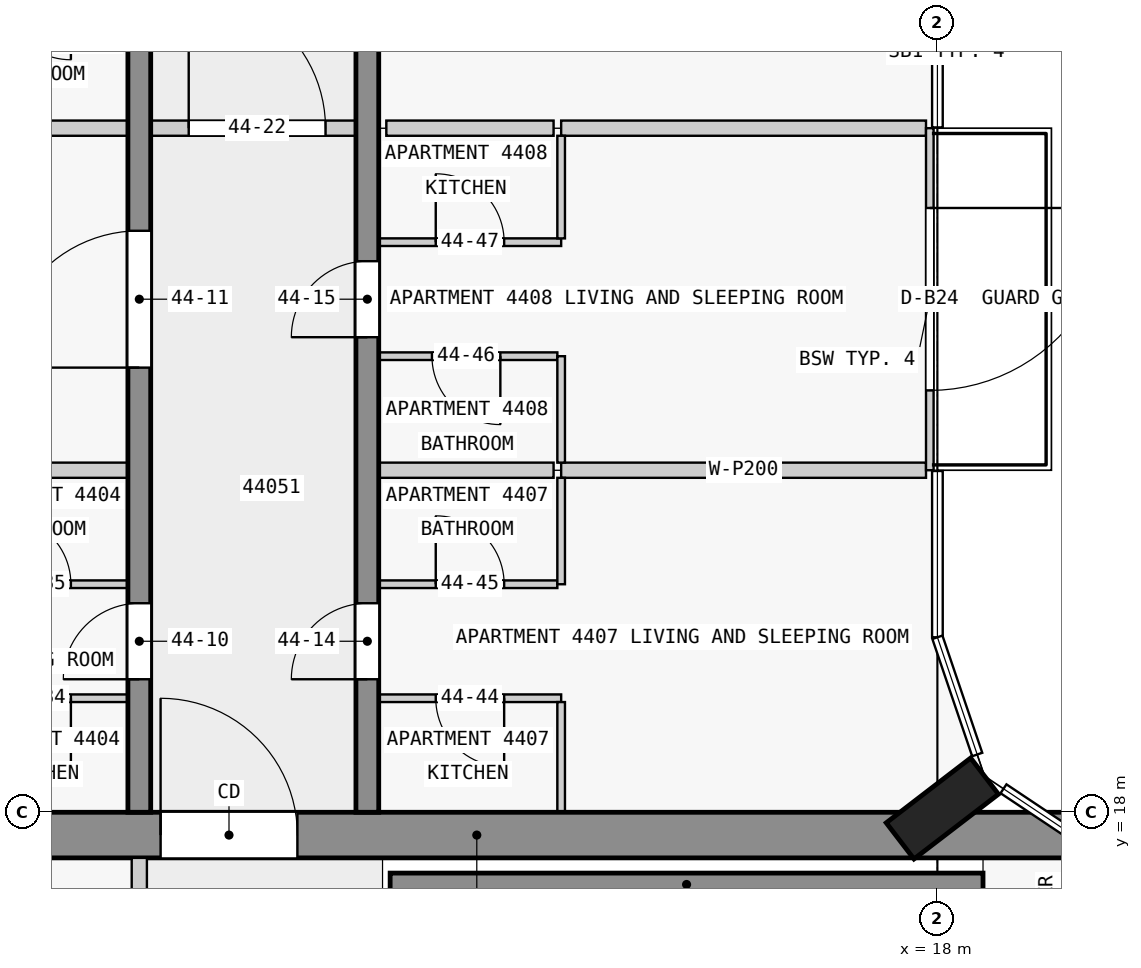
"""IFC4 building model, lengths in metres.
Left out: names, types, materials, properties, quantities, classifications, styles, units other than length and angle.
Written with IfcOpenShell. Run it as: python <this file> out.ifc"""

import sys

from ifc_helpers import new_model, si_unit, direction, frame, frame_2d, origin, origin_2d, place, context, subcontext, project, spatial, rectangle, extrude, element, fill, save


model = new_model("IFC4")
c1 = context("Model", 3, precision=1e-05, world=origin(), true_north=direction((0.0, 1.0)))
c2 = subcontext(c1, "Body", "Model", "MODEL_VIEW")
j1 = project(units=[si_unit("LENGTHUNIT", "METRE"), si_unit("PLANEANGLEUNIT", "RADIAN")], contexts=[c1])
p1 = place(None, origin())
s1 = spatial("IfcSite", under=j1, at=p1, CompositionType="ELEMENT")
p2 = place(p1, origin())
s2 = spatial("IfcBuilding", under=s1, at=p2, CompositionType="ELEMENT")
p3 = place(p2, frame((0.0, 0.0, 170.9)))
s3 = spatial("IfcBuildingStorey", under=s2, at=p3, CompositionType="ELEMENT", Elevation=170.9)
p4 = place(p3, frame((18.065, 18.05, 0.0), z_axis=(0.0, 0.0, 1.0), x_axis=(-0.608810846443, 0.793315418515, 0.0)))
e1 = element("IfcColumn", 1, at=p4, inside=s3, PredefinedType="COLUMN", context=c2, shape_type="SweptSolid", body=[
    extrude(rectangle(XDim=0.6, YDim=1.4, at=origin_2d()), origin(), (0.0, 0.0, 1.0), 3.5),
])
p5 = place(p3, frame((1.38, 17.7, 0.0), z_axis=(0.0, 0.0, 1.0), x_axis=(1.0, 0.0, 0.0)))
e2 = element("IfcWall", 2, at=p5, inside=s3, PredefinedType="SHEAR", context=c2, shape_type="SweptSolid", body=[
    extrude(rectangle(XDim=21.12, YDim=0.6, at=frame_2d((10.56, 0.0))), origin(), (0.0, 0.0, 1.0), 3.25),
])
p6 = place(p5, frame((6.4, 0.0, 0.0)))
e3 = element("IfcOpeningElement", 3, at=p6, cuts=e2, PredefinedType="OPENING", context=c2, shape_type="SweptSolid", body=[
    extrude(rectangle(XDim=1.8, YDim=2.1, at=frame_2d((0.9, 1.05))), frame((0.0, 0.31, 0.0), z_axis=(0.0, -1.0, 0.0), x_axis=(1.0, 0.0, 0.0)), (0.0, 0.0, 1.0), 0.62),
])
p7 = place(p3, frame((10.8, 17.05, 0.0), z_axis=(0.0, 0.0, 1.0), x_axis=(1.0, 0.0, 0.0)))
e4 = element("IfcWall", 4, at=p7, inside=s3, PredefinedType="SHEAR", context=c2, shape_type="SweptSolid", body=[
    extrude(rectangle(XDim=7.8, YDim=0.3, at=frame_2d((3.9, 0.0))), origin(), (0.0, 0.0, 1.0), 3.25),
])
p8 = place(p3, frame((7.5, 18.0, 0.0), z_axis=(0.0, 0.0, 1.0), x_axis=(0.0, 1.0, 0.0)))
e5 = element("IfcWall", 5, at=p8, inside=s3, PredefinedType="SHEAR", context=c2, shape_type="SweptSolid", body=[
    extrude(rectangle(XDim=27.0, YDim=0.3, at=frame_2d((13.5, 0.0))), origin(), (0.0, 0.0, 1.0), 3.25),
])
p9 = place(p8, frame((1.75, 0.0, 0.0)))
e6 = element("IfcOpeningElement", 6, at=p9, cuts=e5, PredefinedType="OPENING", context=c2, shape_type="SweptSolid", body=[
    extrude(rectangle(XDim=1.0, YDim=2.1, at=frame_2d((0.5, 1.05))), frame((0.0, 0.16, 0.0), z_axis=(0.0, -1.0, 0.0), x_axis=(1.0, 0.0, 0.0)), (0.0, 0.0, 1.0), 0.32),
])
p10 = place(p8, frame((5.85, 0.0, 0.0)))
e7 = element("IfcOpeningElement", 7, at=p10, cuts=e5, PredefinedType="OPENING", context=c2, shape_type="SweptSolid", body=[
    extrude(rectangle(XDim=1.8, YDim=2.1, at=frame_2d((0.9, 1.05))), frame((0.0, 0.16, 0.0), z_axis=(0.0, -1.0, 0.0), x_axis=(1.0, 0.0, 0.0)), (0.0, 0.0, 1.0), 0.32),
])
p11 = place(p8, frame((13.05, 0.0, 0.0)))
e8 = element("IfcOpeningElement", 8, at=p11, cuts=e5, PredefinedType="OPENING", context=c2, shape_type="SweptSolid", body=[
    extrude(rectangle(XDim=1.0, YDim=2.1, at=frame_2d((0.5, 1.05))), frame((0.0, 0.16, 0.0), z_axis=(0.0, -1.0, 0.0), x_axis=(1.0, 0.0, 0.0)), (0.0, 0.0, 1.0), 0.32),
])
p12 = place(p8, frame((21.35, 0.0, 0.0)))
e9 = element("IfcOpeningElement", 9, at=p12, cuts=e5, PredefinedType="OPENING", context=c2, shape_type="SweptSolid", body=[
    extrude(rectangle(XDim=1.0, YDim=2.1, at=frame_2d((0.5, 1.05))), frame((0.0, 0.16, 0.0), z_axis=(0.0, -1.0, 0.0), x_axis=(1.0, 0.0, 0.0)), (0.0, 0.0, 1.0), 0.32),
])
p13 = place(p3, frame((10.5, 18.0, 0.0), z_axis=(0.0, 0.0, 1.0), x_axis=(0.0, 1.0, 0.0)))
e10 = element("IfcWall", 10, at=p13, inside=s3, PredefinedType="SHEAR", context=c2, shape_type="SweptSolid", body=[
    extrude(rectangle(XDim=27.0, YDim=0.3, at=frame_2d((13.5, 0.0))), origin(), (0.0, 0.0, 1.0), 3.25),
])
p14 = place(p13, frame((1.75, 0.0, 0.0)))
e11 = element("IfcOpeningElement", 11, at=p14, cuts=e10, PredefinedType="OPENING", context=c2, shape_type="SweptSolid", body=[
    extrude(rectangle(XDim=1.0, YDim=2.1, at=frame_2d((0.5, 1.05))), frame((0.0, 0.16, 0.0), z_axis=(0.0, -1.0, 0.0), x_axis=(1.0, 0.0, 0.0)), (0.0, 0.0, 1.0), 0.32),
])
p15 = place(p13, frame((6.25, 0.0, 0.0)))
e12 = element("IfcOpeningElement", 12, at=p15, cuts=e10, PredefinedType="OPENING", context=c2, shape_type="SweptSolid", body=[
    extrude(rectangle(XDim=1.0, YDim=2.1, at=frame_2d((0.5, 1.05))), frame((0.0, 0.16, 0.0), z_axis=(0.0, -1.0, 0.0), x_axis=(1.0, 0.0, 0.0)), (0.0, 0.0, 1.0), 0.32),
])
p16 = place(p13, frame((10.75, 0.0, 0.0)))
e13 = element("IfcOpeningElement", 13, at=p16, cuts=e10, PredefinedType="OPENING", context=c2, shape_type="SweptSolid", body=[
    extrude(rectangle(XDim=1.0, YDim=2.1, at=frame_2d((0.5, 1.05))), frame((0.0, 0.16, 0.0), z_axis=(0.0, -1.0, 0.0), x_axis=(1.0, 0.0, 0.0)), (0.0, 0.0, 1.0), 0.32),
])
p17 = place(p13, frame((15.25, 0.0, 0.0)))
e14 = element("IfcOpeningElement", 14, at=p17, cuts=e10, PredefinedType="OPENING", context=c2, shape_type="SweptSolid", body=[
    extrude(rectangle(XDim=1.0, YDim=2.1, at=frame_2d((0.5, 1.05))), frame((0.0, 0.16, 0.0), z_axis=(0.0, -1.0, 0.0), x_axis=(1.0, 0.0, 0.0)), (0.0, 0.0, 1.0), 0.32),
])
p18 = place(p13, frame((19.75, 0.0, 0.0)))
e15 = element("IfcOpeningElement", 15, at=p18, cuts=e10, PredefinedType="OPENING", context=c2, shape_type="SweptSolid", body=[
    extrude(rectangle(XDim=1.0, YDim=2.1, at=frame_2d((0.5, 1.05))), frame((0.0, 0.16, 0.0), z_axis=(0.0, -1.0, 0.0), x_axis=(1.0, 0.0, 0.0)), (0.0, 0.0, 1.0), 0.32),
])
p19 = place(p13, frame((23.25, 0.0, 0.0)))
e16 = element("IfcOpeningElement", 16, at=p19, cuts=e10, PredefinedType="OPENING", context=c2, shape_type="SweptSolid", body=[
    extrude(rectangle(XDim=0.9, YDim=2.1, at=frame_2d((0.45, 1.05))), frame((0.0, 0.16, 0.0), z_axis=(0.0, -1.0, 0.0), x_axis=(1.0, 0.0, 0.0)), (0.0, 0.0, 1.0), 0.32),
])
p20 = place(p13, frame((25.45, 0.0, 0.0)))
e17 = element("IfcOpeningElement", 17, at=p20, cuts=e10, PredefinedType="OPENING", context=c2, shape_type="SweptSolid", body=[
    extrude(rectangle(XDim=1.0, YDim=2.1, at=frame_2d((0.5, 1.05))), frame((0.0, 0.16, 0.0), z_axis=(0.0, -1.0, 0.0), x_axis=(1.0, 0.0, 0.0)), (0.0, 0.0, 1.0), 0.32),
])
p21 = place(p3, frame((17.9, 27.0, 0.0), z_axis=(0.0, 0.0, 1.0), x_axis=(0.0, -1.0, 0.0)))
e18 = element("IfcWall", 18, at=p21, inside=s3, PredefinedType="STANDARD", context=c2, shape_type="SweptSolid", body=[
    extrude(rectangle(XDim=4.5, YDim=0.1, at=frame_2d((2.25, 0.0))), origin(), (0.0, 0.0, 1.0), 3.25),
])
p22 = place(p21, frame((1.05, 0.0, 0.0)))
e19 = element("IfcOpeningElement", 19, at=p22, cuts=e18, PredefinedType="OPENING", context=c2, shape_type="SweptSolid", body=[
    extrude(rectangle(XDim=2.4, YDim=2.4, at=frame_2d((1.2, 1.2))), frame((0.0, 0.06, 0.0), z_axis=(0.0, -1.0, 0.0), x_axis=(1.0, 0.0, 0.0)), (0.0, 0.0, 1.0), 0.12),
])
p23 = place(p3, frame((7.5, 10.1, 0.0), z_axis=(0.0, 0.0, 1.0), x_axis=(0.0, 1.0, 0.0)))
e20 = element("IfcWall", 20, at=p23, inside=s3, PredefinedType="PARTITIONING", context=c2, shape_type="SweptSolid", body=[
    extrude(rectangle(XDim=7.3, YDim=0.2, at=frame_2d((3.65, 0.0))), origin(), (0.0, 0.0, 1.0), 3.25),
])
p24 = place(p23, frame((0.775, 0.0, 0.0)))
e21 = element("IfcOpeningElement", 21, at=p24, cuts=e20, PredefinedType="OPENING", context=c2, shape_type="SweptSolid", body=[
    extrude(rectangle(XDim=0.9, YDim=2.1, at=frame_2d((0.45, 1.05))), frame((0.0, 0.11, 0.0), z_axis=(0.0, -1.0, 0.0), x_axis=(1.0, 0.0, 0.0)), (0.0, 0.0, 1.0), 0.22),
])
p25 = place(p23, frame((3.225, 0.0, 0.0)))
e22 = element("IfcOpeningElement", 22, at=p25, cuts=e20, PredefinedType="OPENING", context=c2, shape_type="SweptSolid", body=[
    extrude(rectangle(XDim=0.9, YDim=2.1, at=frame_2d((0.45, 1.05))), frame((0.0, 0.11, 0.0), z_axis=(0.0, -1.0, 0.0), x_axis=(1.0, 0.0, 0.0)), (0.0, 0.0, 1.0), 0.22),
])
p26 = place(p23, frame((5.25, 0.0, 0.0)))
e23 = element("IfcOpeningElement", 23, at=p26, cuts=e20, PredefinedType="OPENING", context=c2, shape_type="SweptSolid", body=[
    extrude(rectangle(XDim=0.9, YDim=2.1, at=frame_2d((0.45, 1.05))), frame((0.0, 0.11, 0.0), z_axis=(0.0, -1.0, 0.0), x_axis=(1.0, 0.0, 0.0)), (0.0, 0.0, 1.0), 0.22),
])
p27 = place(p3, frame((7.35, 19.5, 0.0), z_axis=(0.0, 0.0, 1.0), x_axis=(-1.0, 0.0, 0.0)))
e24 = element("IfcWall", 24, at=p27, inside=s3, PredefinedType="PARTITIONING", context=c2, shape_type="SweptSolid", body=[
    extrude(rectangle(XDim=2.4, YDim=0.1, at=frame_2d((1.2, 0.0))), origin(), (0.0, 0.0, 1.0), 3.25),
])
p28 = place(p27, frame((0.75, 0.0, 0.0)))
e25 = element("IfcOpeningElement", 25, at=p28, cuts=e24, PredefinedType="OPENING", context=c2, shape_type="SweptSolid", body=[
    extrude(rectangle(XDim=0.9, YDim=2.1, at=frame_2d((0.45, 1.05))), frame((0.0, 0.06, 0.0), z_axis=(0.0, -1.0, 0.0), x_axis=(1.0, 0.0, 0.0)), (0.0, 0.0, 1.0), 0.12),
])
p29 = place(p3, frame((13.05, 19.5, 0.0), z_axis=(0.0, 0.0, 1.0), x_axis=(-1.0, 0.0, 0.0)))
e26 = element("IfcWall", 26, at=p29, inside=s3, PredefinedType="PARTITIONING", context=c2, shape_type="SweptSolid", body=[
    extrude(rectangle(XDim=2.4, YDim=0.1, at=frame_2d((1.2, 0.0))), origin(), (0.0, 0.0, 1.0), 3.25),
])
p30 = place(p29, frame((0.75, 0.0, 0.0)))
e27 = element("IfcOpeningElement", 27, at=p30, cuts=e26, PredefinedType="OPENING", context=c2, shape_type="SweptSolid", body=[
    extrude(rectangle(XDim=0.9, YDim=2.1, at=frame_2d((0.45, 1.05))), frame((0.0, 0.06, 0.0), z_axis=(0.0, -1.0, 0.0), x_axis=(1.0, 0.0, 0.0)), (0.0, 0.0, 1.0), 0.12),
])
p31 = place(p3, frame((4.95, 21.0, 0.0), z_axis=(0.0, 0.0, 1.0), x_axis=(1.0, 0.0, 0.0)))
e28 = element("IfcWall", 28, at=p31, inside=s3, PredefinedType="PARTITIONING", context=c2, shape_type="SweptSolid", body=[
    extrude(rectangle(XDim=2.4, YDim=0.1, at=frame_2d((1.2, 0.0))), origin(), (0.0, 0.0, 1.0), 3.25),
])
p32 = place(p31, frame((0.75, 0.0, 0.0)))
e29 = element("IfcOpeningElement", 29, at=p32, cuts=e28, PredefinedType="OPENING", context=c2, shape_type="SweptSolid", body=[
    extrude(rectangle(XDim=0.9, YDim=2.1, at=frame_2d((0.45, 1.05))), frame((0.0, 0.06, 0.0), z_axis=(0.0, -1.0, 0.0), x_axis=(1.0, 0.0, 0.0)), (0.0, 0.0, 1.0), 0.12),
])
p33 = place(p3, frame((10.65, 21.0, 0.0), z_axis=(0.0, 0.0, 1.0), x_axis=(1.0, 0.0, 0.0)))
e30 = element("IfcWall", 30, at=p33, inside=s3, PredefinedType="PARTITIONING", context=c2, shape_type="SweptSolid", body=[
    extrude(rectangle(XDim=2.35, YDim=0.1, at=frame_2d((1.175, 0.0))), origin(), (0.0, 0.0, 1.0), 3.25),
])
p34 = place(p33, frame((0.75, 0.0, 0.0)))
e31 = element("IfcOpeningElement", 31, at=p34, cuts=e30, PredefinedType="OPENING", context=c2, shape_type="SweptSolid", body=[
    extrude(rectangle(XDim=0.9, YDim=2.1, at=frame_2d((0.45, 1.05))), frame((0.0, 0.06, 0.0), z_axis=(0.0, -1.0, 0.0), x_axis=(1.0, 0.0, 0.0)), (0.0, 0.0, 1.0), 0.12),
])
for number, where, z_axis, x_axis in (
    (32, (7.35, 22.5, 0.0), (0.0, 0.0, 1.0), (-1.0, 0.0, 0.0)),
    (33, (12.95, 22.5, 0.0), (0.0, 0.0, 1.0), (-1.0, 0.0, 0.0)),
):
    element("IfcWall", number, at=place(p3, frame(where, z_axis=z_axis, x_axis=x_axis)), inside=s3, PredefinedType="PARTITIONING", context=c2, shape_type="SweptSolid", body=[
        extrude(rectangle(XDim=2.3, YDim=0.2, at=frame_2d((1.15, 0.0))), origin(), (0.0, 0.0, 1.0), 3.25),
    ])
p35 = place(p3, frame((13.05, 22.5, 0.0), z_axis=(0.0, 0.0, 1.0), x_axis=(1.0, 0.0, 0.0)))
e34 = element("IfcWall", 34, at=p35, inside=s3, PredefinedType="PARTITIONING", context=c2, shape_type="SweptSolid", body=[
    extrude(rectangle(XDim=4.8, YDim=0.2, at=frame_2d((2.4, 0.0))), origin(), (0.0, 0.0, 1.0), 3.25),
])
p36 = place(p3, frame((13.0, 24.0, 0.0), z_axis=(0.0, 0.0, 1.0), x_axis=(-1.0, 0.0, 0.0)))
e35 = element("IfcWall", 35, at=p36, inside=s3, PredefinedType="PARTITIONING", context=c2, shape_type="SweptSolid", body=[
    extrude(rectangle(XDim=2.35, YDim=0.1, at=frame_2d((1.175, 0.0))), origin(), (0.0, 0.0, 1.0), 3.25),
])
p37 = place(p36, frame((0.75, 0.0, 0.0)))
e36 = element("IfcOpeningElement", 36, at=p37, cuts=e35, PredefinedType="OPENING", context=c2, shape_type="SweptSolid", body=[
    extrude(rectangle(XDim=0.9, YDim=2.1, at=frame_2d((0.45, 1.05))), frame((0.0, 0.06, 0.0), z_axis=(0.0, -1.0, 0.0), x_axis=(1.0, 0.0, 0.0)), (0.0, 0.0, 1.0), 0.12),
])
p38 = place(p3, frame((10.65, 25.5, 0.0), z_axis=(0.0, 0.0, 1.0), x_axis=(1.0, 0.0, 0.0)))
e37 = element("IfcWall", 37, at=p38, inside=s3, PredefinedType="PARTITIONING", context=c2, shape_type="SweptSolid", body=[
    extrude(rectangle(XDim=2.4, YDim=0.1, at=frame_2d((1.2, 0.0))), origin(), (0.0, 0.0, 1.0), 3.25),
])
p39 = place(p38, frame((0.75, 0.0, 0.0)))
e38 = element("IfcOpeningElement", 38, at=p39, cuts=e37, PredefinedType="OPENING", context=c2, shape_type="SweptSolid", body=[
    extrude(rectangle(XDim=0.9, YDim=2.1, at=frame_2d((0.45, 1.05))), frame((0.0, 0.06, 0.0), z_axis=(0.0, -1.0, 0.0), x_axis=(1.0, 0.0, 0.0)), (0.0, 0.0, 1.0), 0.12),
])
p40 = place(p3, frame((7.35, 27.0, 0.0), z_axis=(0.0, 0.0, 1.0), x_axis=(-1.0, 0.0, 0.0)))
e39 = element("IfcWall", 39, at=p40, inside=s3, PredefinedType="PARTITIONING", context=c2, shape_type="SweptSolid", body=[
    extrude(rectangle(XDim=7.43, YDim=0.2, at=frame_2d((3.715, 0.0))), origin(), (0.0, 0.0, 1.0), 3.25),
])
p41 = place(p3, frame((12.95, 27.0, 0.0), z_axis=(0.0, 0.0, 1.0), x_axis=(-1.0, 0.0, 0.0)))
e40 = element("IfcWall", 40, at=p41, inside=s3, PredefinedType="PARTITIONING", context=c2, shape_type="SweptSolid", body=[
    extrude(rectangle(XDim=2.2, YDim=0.2, at=frame_2d((1.1, 0.0))), origin(), (0.0, 0.0, 1.0), 3.25),
])
p42 = place(p3, frame((13.05, 27.0, 0.0), z_axis=(0.0, 0.0, 1.0), x_axis=(1.0, 0.0, 0.0)))
e41 = element("IfcWall", 41, at=p42, inside=s3, PredefinedType="PARTITIONING", context=c2, shape_type="SweptSolid", body=[
    extrude(rectangle(XDim=4.8, YDim=0.2, at=frame_2d((2.4, 0.0))), origin(), (0.0, 0.0, 1.0), 3.25),
])
p43 = place(p3, frame((13.05, 18.0, 0.0), z_axis=(0.0, 0.0, 1.0), x_axis=(0.0, 1.0, 0.0)))
e42 = element("IfcWall", 42, at=p43, inside=s3, PredefinedType="PARTITIONING", context=c2, shape_type="SweptSolid", body=[
    extrude(rectangle(XDim=1.45, YDim=0.1, at=frame_2d((0.725, 0.0))), origin(), (0.0, 0.0, 1.0), 3.25),
])
for number, where, z_axis, x_axis in (
    (43, (13.05, 21.0, 0.0), (0.0, 0.0, 1.0), (0.0, 1.0, 0.0)),
    (44, (13.05, 22.6, 0.0), (0.0, 0.0, 1.0), (0.0, 1.0, 0.0)),
):
    element("IfcWall", number, at=place(p3, frame(where, z_axis=z_axis, x_axis=x_axis)), inside=s3, PredefinedType="PARTITIONING", context=c2, shape_type="SweptSolid", body=[
        extrude(rectangle(XDim=1.4, YDim=0.1, at=frame_2d((0.7, 0.0))), origin(), (0.0, 0.0, 1.0), 3.25),
    ])
p44 = place(p3, frame((13.05, 25.55, 0.0), z_axis=(0.0, 0.0, 1.0), x_axis=(0.0, 1.0, 0.0)))
e45 = element("IfcWall", 45, at=p44, inside=s3, PredefinedType="PARTITIONING", context=c2, shape_type="SweptSolid", body=[
    extrude(rectangle(XDim=1.35, YDim=0.1, at=frame_2d((0.675, 0.0))), origin(), (0.0, 0.0, 1.0), 3.25),
])
p45 = place(p3, frame((7.45, 27.0, 0.0), z_axis=(0.0, 0.0, 1.0), x_axis=(1.0, 0.0, 0.0)))
e46 = element("IfcWall", 46, at=p45, inside=s3, PredefinedType="PARTITIONING", context=c2, shape_type="SweptSolid", body=[
    extrude(rectangle(XDim=3.2, YDim=0.2, at=frame_2d((1.6, 0.0))), origin(), (0.0, 0.0, 1.0), 3.25),
])
p46 = place(p45, frame((0.7, 0.0, 0.0)))
e47 = element("IfcOpeningElement", 47, at=p46, cuts=e46, PredefinedType="OPENING", context=c2, shape_type="SweptSolid", body=[
    extrude(rectangle(XDim=1.8, YDim=2.1, at=frame_2d((0.9, 1.05))), frame((0.0, 0.11, 0.0), z_axis=(0.0, -1.0, 0.0), x_axis=(1.0, 0.0, 0.0)), (0.0, 0.0, 1.0), 0.22),
])
p47 = place(p22, origin())
e48 = element("IfcDoor", 48, at=p47, inside=s3, OperationType="SINGLE_SWING_LEFT", PredefinedType="DOOR", context=c2, shape_type="SweptSolid", body=[
    extrude(rectangle(XDim=2.4, YDim=2.4, at=frame_2d((1.2, 1.2))), frame((0.0, 0.025, 0.0), z_axis=(0.0, -1.0, 0.0), x_axis=(1.0, 0.0, 0.0)), (0.0, 0.0, 1.0), 0.05),
])
fill(e19, e48)
p48 = place(p6, origin())
e49 = element("IfcDoor", 49, at=p48, inside=s3, OperationType="DOUBLE_DOOR_SINGLE_SWING", PredefinedType="DOOR", context=c2, shape_type="SweptSolid", body=[
    extrude(rectangle(XDim=1.8, YDim=2.1, at=frame_2d((0.9, 1.05))), frame((0.0, 0.025, 0.0), z_axis=(0.0, -1.0, 0.0), x_axis=(1.0, 0.0, 0.0)), (0.0, 0.0, 1.0), 0.05),
])
fill(e3, e49)
p49 = place(p9, origin())
e50 = element("IfcDoor", 50, at=p49, inside=s3, OperationType="SINGLE_SWING_LEFT", PredefinedType="DOOR", context=c2, shape_type="SweptSolid", body=[
    extrude(rectangle(XDim=1.0, YDim=2.1, at=frame_2d((0.5, 1.05))), frame((0.0, 0.025, 0.0), z_axis=(0.0, -1.0, 0.0), x_axis=(1.0, 0.0, 0.0)), (0.0, 0.0, 1.0), 0.05),
])
fill(e6, e50)
p50 = place(p10, origin())
e51 = element("IfcDoor", 51, at=p50, inside=s3, OperationType="SINGLE_SWING_LEFT", PredefinedType="DOOR", context=c2, shape_type="SweptSolid", body=[
    extrude(rectangle(XDim=1.8, YDim=2.1, at=frame_2d((0.9, 1.05))), frame((0.0, 0.025, 0.0), z_axis=(0.0, -1.0, 0.0), x_axis=(1.0, 0.0, 0.0)), (0.0, 0.0, 1.0), 0.05),
])
fill(e7, e51)
p51 = place(p14, origin())
e52 = element("IfcDoor", 52, at=p51, inside=s3, OperationType="SINGLE_SWING_LEFT", PredefinedType="DOOR", context=c2, shape_type="SweptSolid", body=[
    extrude(rectangle(XDim=1.0, YDim=2.1, at=frame_2d((0.5, 1.05))), frame((0.0, 0.025, 0.0), z_axis=(0.0, -1.0, 0.0), x_axis=(1.0, 0.0, 0.0)), (0.0, 0.0, 1.0), 0.05),
])
fill(e11, e52)
p52 = place(p15, origin())
e53 = element("IfcDoor", 53, at=p52, inside=s3, OperationType="SINGLE_SWING_LEFT", PredefinedType="DOOR", context=c2, shape_type="SweptSolid", body=[
    extrude(rectangle(XDim=1.0, YDim=2.1, at=frame_2d((0.5, 1.05))), frame((0.0, 0.025, 0.0), z_axis=(0.0, -1.0, 0.0), x_axis=(1.0, 0.0, 0.0)), (0.0, 0.0, 1.0), 0.05),
])
fill(e12, e53)
p53 = place(p46, origin())
e54 = element("IfcDoor", 54, at=p53, inside=s3, OperationType="SINGLE_SWING_LEFT", PredefinedType="DOOR", context=c2, shape_type="SweptSolid", body=[
    extrude(rectangle(XDim=1.8, YDim=2.1, at=frame_2d((0.9, 1.05))), frame((0.0, 0.025, 0.0), z_axis=(0.0, -1.0, 0.0), x_axis=(1.0, 0.0, 0.0)), (0.0, 0.0, 1.0), 0.05),
])
fill(e47, e54)
p54 = place(p28, origin())
e55 = element("IfcDoor", 55, at=p54, inside=s3, OperationType="SINGLE_SWING_RIGHT", PredefinedType="DOOR", context=c2, shape_type="SweptSolid", body=[
    extrude(rectangle(XDim=0.9, YDim=2.1, at=frame_2d((0.45, 1.05))), frame((0.0, 0.025, 0.0), z_axis=(0.0, -1.0, 0.0), x_axis=(1.0, 0.0, 0.0)), (0.0, 0.0, 1.0), 0.05),
])
fill(e25, e55)
p55 = place(p32, origin())
e56 = element("IfcDoor", 56, at=p55, inside=s3, OperationType="SINGLE_SWING_RIGHT", PredefinedType="DOOR", context=c2, shape_type="SweptSolid", body=[
    extrude(rectangle(XDim=0.9, YDim=2.1, at=frame_2d((0.45, 1.05))), frame((0.0, 0.025, 0.0), z_axis=(0.0, -1.0, 0.0), x_axis=(1.0, 0.0, 0.0)), (0.0, 0.0, 1.0), 0.05),
])
fill(e29, e56)
p56 = place(p30, origin())
e57 = element("IfcDoor", 57, at=p56, inside=s3, OperationType="SINGLE_SWING_LEFT", PredefinedType="DOOR", context=c2, shape_type="SweptSolid", body=[
    extrude(rectangle(XDim=0.9, YDim=2.1, at=frame_2d((0.45, 1.05))), frame((0.0, 0.025, 0.0), z_axis=(0.0, -1.0, 0.0), x_axis=(1.0, 0.0, 0.0)), (0.0, 0.0, 1.0), 0.05),
])
fill(e27, e57)
p57 = place(p34, origin())
e58 = element("IfcDoor", 58, at=p57, inside=s3, OperationType="SINGLE_SWING_RIGHT", PredefinedType="DOOR", context=c2, shape_type="SweptSolid", body=[
    extrude(rectangle(XDim=0.9, YDim=2.1, at=frame_2d((0.45, 1.05))), frame((0.0, 0.025, 0.0), z_axis=(0.0, -1.0, 0.0), x_axis=(1.0, 0.0, 0.0)), (0.0, 0.0, 1.0), 0.05),
])
fill(e31, e58)
p58 = place(p37, origin())
e59 = element("IfcDoor", 59, at=p58, inside=s3, OperationType="SINGLE_SWING_RIGHT", PredefinedType="DOOR", context=c2, shape_type="SweptSolid", body=[
    extrude(rectangle(XDim=0.9, YDim=2.1, at=frame_2d((0.45, 1.05))), frame((0.0, 0.025, 0.0), z_axis=(0.0, -1.0, 0.0), x_axis=(1.0, 0.0, 0.0)), (0.0, 0.0, 1.0), 0.05),
])
fill(e36, e59)
p59 = place(p39, origin())
e60 = element("IfcDoor", 60, at=p59, inside=s3, OperationType="SINGLE_SWING_LEFT", PredefinedType="DOOR", context=c2, shape_type="SweptSolid", body=[
    extrude(rectangle(XDim=0.9, YDim=2.1, at=frame_2d((0.45, 1.05))), frame((0.0, 0.025, 0.0), z_axis=(0.0, -1.0, 0.0), x_axis=(1.0, 0.0, 0.0)), (0.0, 0.0, 1.0), 0.05),
])
fill(e38, e60)
save(model, sys.argv[1])
